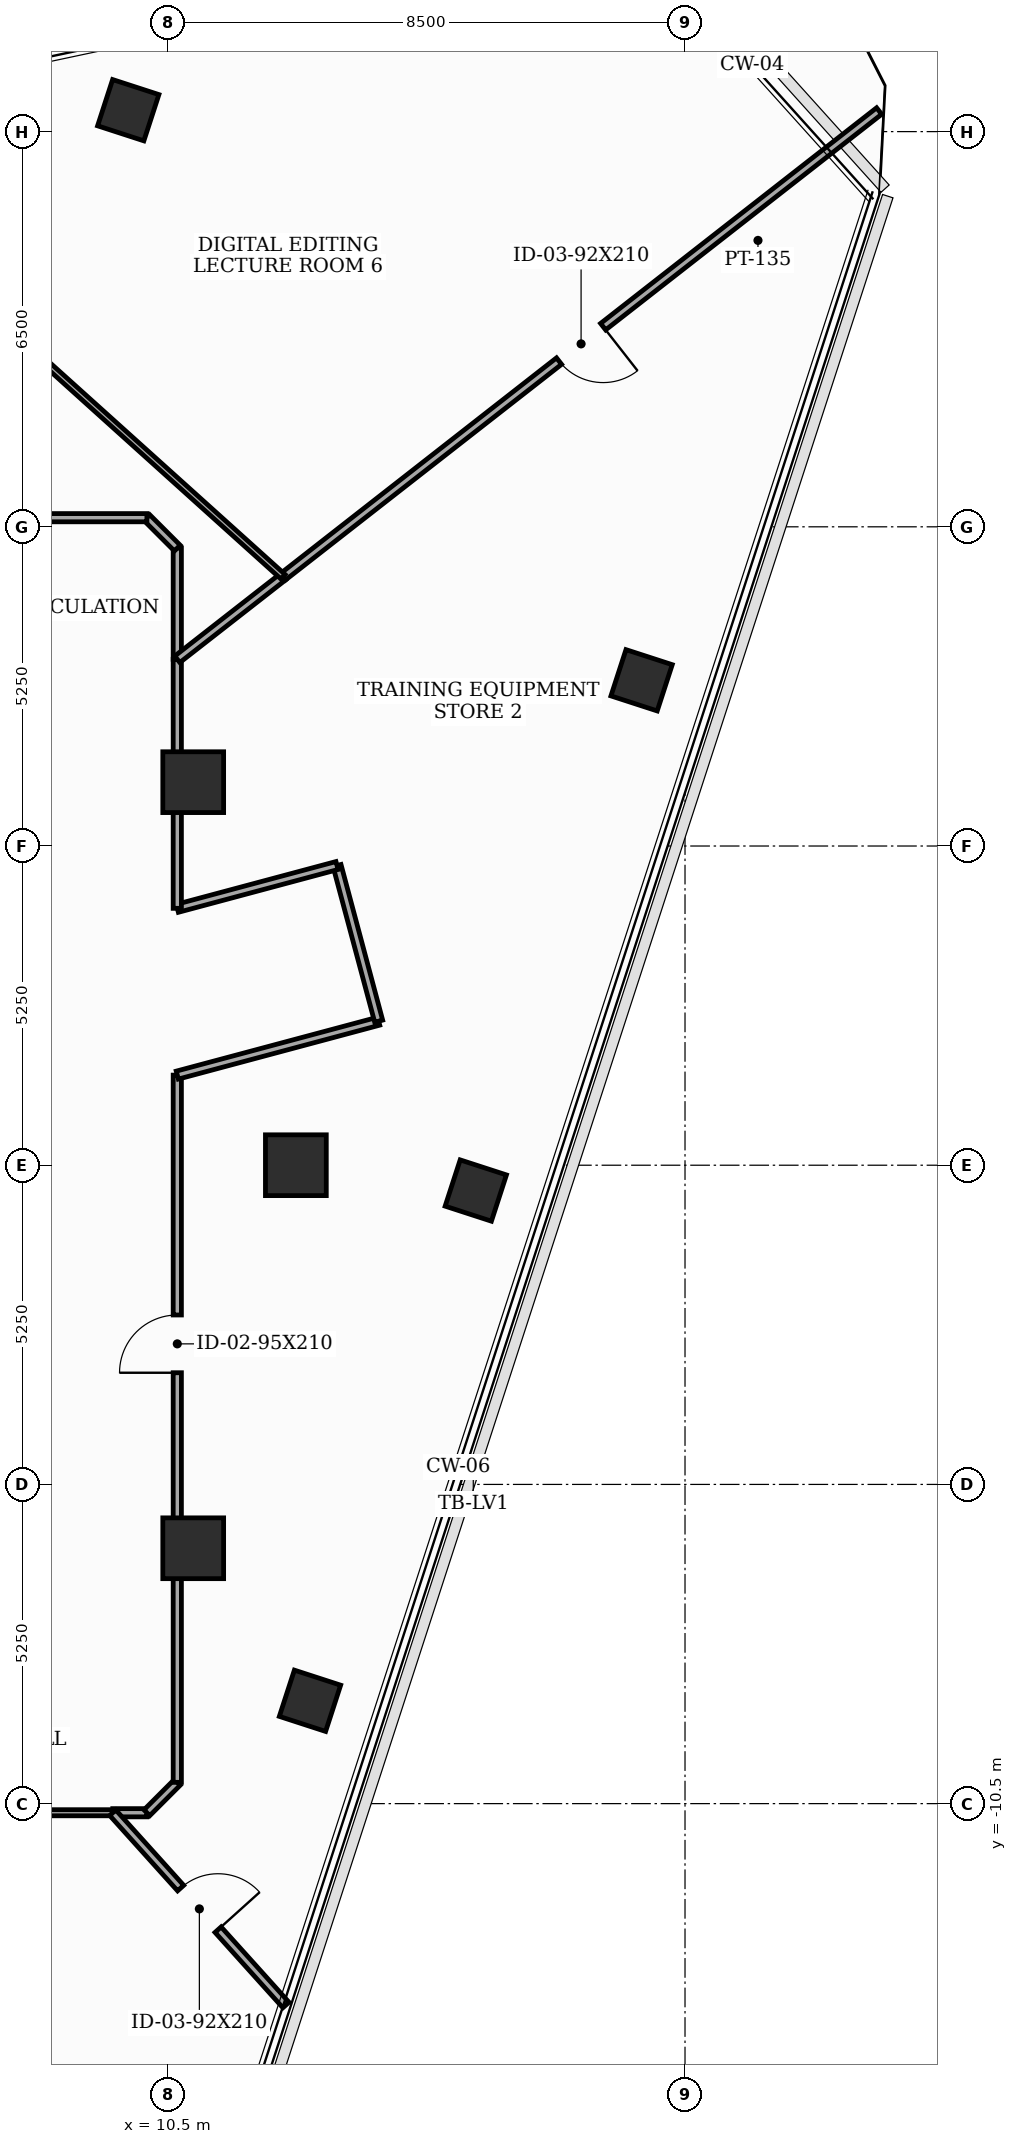
"""IFC4 building model, lengths in metres.
Left out: names, types, materials, properties, quantities, classifications, styles, units other than length and angle.
Written with IfcOpenShell. Run it as: python <this file> out.ifc"""

import sys

from ifc_helpers import new_model, si_unit, direction, frame, frame_2d, origin, origin_2d, place, context, subcontext, project, spatial, rectangle, extrude, element, fill, save


model = new_model("IFC4")
c1 = context("Model", 3, precision=1e-05, world=origin(), true_north=direction((0.0, 1.0)))
c2 = subcontext(c1, "Body", "Model", "MODEL_VIEW")
j1 = project(units=[si_unit("LENGTHUNIT", "METRE"), si_unit("PLANEANGLEUNIT", "RADIAN")], contexts=[c1])
p1 = place(None, origin())
s1 = spatial("IfcSite", under=j1, at=p1, CompositionType="ELEMENT")
p2 = place(p1, origin())
s2 = spatial("IfcBuilding", under=s1, at=p2, CompositionType="ELEMENT")
p3 = place(p2, frame((0.0, 0.0, 290.6)))
s3 = spatial("IfcBuildingStorey", under=s2, at=p3, CompositionType="ELEMENT", Elevation=290.6)
for number, where, z_axis, x_axis in (
    (1, (12.6, 0.0, 0.0), (0.0, 0.0, 1.0), (1.0, 0.0, 0.0)),
    (2, (10.912, 6.3, 0.0), (0.0, 0.0, 1.0), (1.0, 0.0, 0.0)),
    (3, (10.912, -6.3, 0.0), (0.0, 0.0, 1.0), (1.0, 0.0, 0.0)),
):
    element("IfcColumn", number, at=place(p3, frame(where, z_axis=z_axis, x_axis=x_axis)), inside=s3, PredefinedType="COLUMN", context=c2, shape_type="SweptSolid", body=[
        extrude(rectangle(XDim=1.0, YDim=1.0, at=origin_2d()), origin(), (0.0, 0.0, 1.0), 3.7),
    ])
for number, where, z_axis, x_axis in (
    (4, (12.833, -8.809, 0.0), (0.0, 0.0, 1.0), (0.309, 0.951, 0.0)),
    (5, (15.559, -0.417, 0.0), (0.0, 0.0, 1.0), (0.309, 0.951, 0.0)),
    (6, (18.286, 7.976, 0.0), (0.0, 0.0, 1.0), (0.309, 0.951, 0.0)),
    (7, (9.844, 17.352, 0.0), (0.0, 0.0, 1.0), (0.309, 0.951, 0.0)),
):
    element("IfcColumn", number, at=place(p3, frame(where, z_axis=z_axis, x_axis=x_axis)), inside=s3, PredefinedType="COLUMN", context=c2, shape_type="SweptSolid", body=[
        extrude(rectangle(XDim=0.8, YDim=0.8, at=origin_2d()), origin(), (0.0, 0.0, 1.0), 3.7),
    ])
p4 = place(p3, frame((9.589, -10.65, 0.0), z_axis=(0.0, 0.0, 1.0), x_axis=(1.0, 0.0, 0.0)))
e8 = element("IfcWall", 8, at=p4, inside=s3, PredefinedType="PARTITIONING", context=c2, shape_type="SweptSolid", body=[
    extrude(rectangle(XDim=0.561, YDim=0.135, at=frame_2d((0.28, 0.0))), origin(), (0.0, 0.0, 1.0), 3.5),
])
p5 = place(p3, frame((10.15, -10.65, 0.0), z_axis=(0.0, 0.0, 1.0), x_axis=(0.707106781187, 0.707106781187, 0.0)))
e9 = element("IfcWall", 9, at=p5, inside=s3, PredefinedType="PARTITIONING", context=c2, shape_type="SweptSolid", body=[
    extrude(rectangle(XDim=0.707, YDim=0.135, at=frame_2d((0.354, 0.0))), origin(), (0.0, 0.0, 1.0), 3.5),
])
p6 = place(p3, frame((10.65, -10.15, 0.0), z_axis=(0.0, 0.0, 1.0), x_axis=(0.0, 1.0, 0.0)))
e10 = element("IfcWall", 10, at=p6, inside=s3, PredefinedType="PARTITIONING", context=c2, shape_type="SweptSolid", body=[
    extrude(rectangle(XDim=11.632, YDim=0.135, at=frame_2d((5.816, 0.0))), origin(), (0.0, 0.0, 1.0), 2.885),
])
p7 = place(p6, frame((6.737, 0.0, 0.0)))
e11 = element("IfcOpeningElement", 11, at=p7, cuts=e10, PredefinedType="OPENING", context=c2, shape_type="SweptSolid", body=[
    extrude(rectangle(XDim=0.95, YDim=2.1, at=frame_2d((0.475, 1.05))), frame((0.0, 0.077, 0.0), z_axis=(0.0, -1.0, 0.0), x_axis=(1.0, 0.0, 0.0)), (0.0, 0.0, 1.0), 0.155),
])
p8 = place(p3, frame((10.65, 1.482, 0.0), z_axis=(0.0, 0.0, 1.0), x_axis=(0.965961397105, 0.2586862565, 0.0)))
e12 = element("IfcWall", 12, at=p8, inside=s3, PredefinedType="PARTITIONING", context=c2, shape_type="SweptSolid", body=[
    extrude(rectangle(XDim=3.429, YDim=0.135, at=frame_2d((1.714, 0.0))), origin(), (0.0, 0.0, 1.0), 2.885),
])
p9 = place(p3, frame((13.962, 2.369, 0.0), z_axis=(0.0, 0.0, 1.0), x_axis=(-0.258413725385, 0.966034340245, 0.0)))
e13 = element("IfcWall", 13, at=p9, inside=s3, PredefinedType="PARTITIONING", context=c2, shape_type="SweptSolid", body=[
    extrude(rectangle(XDim=2.65, YDim=0.135, at=frame_2d((1.325, 0.0))), origin(), (0.0, 0.0, 1.0), 3.5),
])
p10 = place(p3, frame((13.277, 4.929, 0.0), z_axis=(0.0, 0.0, 1.0), x_axis=(-0.965934830229, -0.258785439601, 0.0)))
e14 = element("IfcWall", 14, at=p10, inside=s3, PredefinedType="PARTITIONING", context=c2, shape_type="SweptSolid", body=[
    extrude(rectangle(XDim=2.72, YDim=0.135, at=frame_2d((1.36, 0.0))), origin(), (0.0, 0.0, 1.0), 2.885),
])
p11 = place(p3, frame((10.65, 4.225, 0.0), z_axis=(0.0, 0.0, 1.0), x_axis=(0.0, 1.0, 0.0)))
e15 = element("IfcWall", 15, at=p11, inside=s3, PredefinedType="PARTITIONING", context=c2, shape_type="SweptSolid", body=[
    extrude(rectangle(XDim=4.096, YDim=0.135, at=frame_2d((2.048, 0.0))), origin(), (0.0, 0.0, 1.0), 2.885),
])
p12 = place(p3, frame((2.45, -10.65, 0.0), z_axis=(0.0, 0.0, 1.0), x_axis=(1.0, 0.0, 0.0)))
e16 = element("IfcWall", 16, at=p12, inside=s3, PredefinedType="MOVABLE", context=c2, shape_type="SweptSolid", body=[
    extrude(rectangle(XDim=7.139, YDim=0.1, at=frame_2d((3.57, 0.0))), origin(), (0.0, 0.0, 1.0), 2.885),
])
p13 = place(p3, frame((10.65, 8.321, 0.0), z_axis=(0.0, 0.0, 1.0), x_axis=(0.0, 1.0, 0.0)))
e17 = element("IfcWall", 17, at=p13, inside=s3, PredefinedType="PARTITIONING", context=c2, shape_type="SweptSolid", body=[
    extrude(rectangle(XDim=1.829, YDim=0.135, at=frame_2d((0.915, 0.0))), origin(), (0.0, 0.0, 1.0), 3.5),
])
p14 = place(p3, frame((10.65, 10.15, 0.0), z_axis=(0.0, 0.0, 1.0), x_axis=(-0.707106781187, 0.707106781187, 0.0)))
e18 = element("IfcWall", 18, at=p14, inside=s3, PredefinedType="PARTITIONING", context=c2, shape_type="SweptSolid", body=[
    extrude(rectangle(XDim=0.707, YDim=0.135, at=frame_2d((0.354, 0.0))), origin(), (0.0, 0.0, 1.0), 3.5),
])
p15 = place(p3, frame((10.15, 10.65, 0.0), z_axis=(0.0, 0.0, 1.0), x_axis=(-1.0, 0.0, 0.0)))
e19 = element("IfcWall", 19, at=p15, inside=s3, PredefinedType="PARTITIONING", context=c2, shape_type="SweptSolid", body=[
    extrude(rectangle(XDim=11.3, YDim=0.135, at=frame_2d((5.65, 0.0))), origin(), (0.0, 0.0, 1.0), 2.885),
])
p16 = place(p15, frame((6.531, 0.0, 0.0)))
e20 = element("IfcOpeningElement", 20, at=p16, cuts=e19, PredefinedType="OPENING", context=c2, shape_type="SweptSolid", body=[
    extrude(rectangle(XDim=0.95, YDim=2.1, at=frame_2d((0.475, 1.05))), frame((0.0, 0.077, 0.0), z_axis=(0.0, -1.0, 0.0), x_axis=(1.0, 0.0, 0.0)), (0.0, 0.0, 1.0), 0.155),
])
p17 = place(p3, frame((9.589, -10.65, 0.0), z_axis=(0.0, 0.0, 1.0), x_axis=(0.66916439333, -0.743114402161, 0.0)))
e21 = element("IfcWall", 21, at=p17, inside=s3, PredefinedType="PARTITIONING", context=c2, shape_type="SweptSolid", body=[
    extrude(rectangle(XDim=4.256, YDim=0.135, at=frame_2d((2.128, 0.0))), origin(), (0.0, 0.0, 1.0), 3.035),
])
p18 = place(p17, frame((1.668, 0.0, 0.0)))
e22 = element("IfcOpeningElement", 22, at=p18, cuts=e21, PredefinedType="OPENING", context=c2, shape_type="SweptSolid", body=[
    extrude(rectangle(XDim=0.92, YDim=2.1, at=frame_2d((0.46, 1.05))), frame((0.0, 0.077, 0.0), z_axis=(0.0, -1.0, 0.0), x_axis=(1.0, 0.0, 0.0)), (0.0, 0.0, 1.0), 0.155),
])
p19 = place(p3, frame((22.192, 17.338, 0.0), z_axis=(0.0, 0.0, 1.0), x_axis=(-0.788006224946, -0.615667271703, 0.0)))
e23 = element("IfcWall", 23, at=p19, inside=s3, PredefinedType="PARTITIONING", context=c2, shape_type="SweptSolid", body=[
    extrude(rectangle(XDim=12.441, YDim=0.135, at=frame_2d((6.22, 0.0))), origin(), (0.0, 0.0, 1.0), 3.035),
])
p20 = place(p19, frame((5.76, 0.0, 0.0)))
e24 = element("IfcOpeningElement", 24, at=p20, cuts=e23, PredefinedType="OPENING", context=c2, shape_type="SweptSolid", body=[
    extrude(rectangle(XDim=0.92, YDim=2.1, at=frame_2d((0.46, 1.05))), frame((0.0, 0.077, 0.0), z_axis=(0.0, -1.0, 0.0), x_axis=(1.0, 0.0, 0.0)), (0.0, 0.0, 1.0), 0.155),
])
p21 = place(p3, frame((12.389, 9.679, 0.0), z_axis=(0.0, 0.0, 1.0), x_axis=(-0.788177008199, -0.615448619908, 0.0)))
e25 = element("IfcWall", 25, at=p21, inside=s3, PredefinedType="PARTITIONING", context=c2, shape_type="SweptSolid", body=[
    extrude(rectangle(XDim=2.206, YDim=0.135, at=frame_2d((1.103, 0.0))), origin(), (0.0, 0.0, 1.0), 3.5),
])
p22 = place(p3, frame((8.019, 13.614, 0.0), z_axis=(0.0, 0.0, 1.0), x_axis=(0.743110388877, -0.669168850099, 0.0)))
e26 = element("IfcWall", 26, at=p22, inside=s3, PredefinedType="MOVABLE", context=c2, shape_type="SweptSolid", body=[
    extrude(rectangle(XDim=5.881, YDim=0.1, at=frame_2d((2.94, 0.0))), origin(), (0.0, 0.0, 1.0), 3.035),
])
p23 = place(p7, origin())
e27 = element("IfcDoor", 27, at=p23, inside=s3, OperationType="SINGLE_SWING_LEFT", PredefinedType="DOOR", context=c2, shape_type="SweptSolid", body=[
    extrude(rectangle(XDim=0.95, YDim=2.1, at=frame_2d((0.475, 1.05))), frame((0.0, 0.025, 0.0), z_axis=(0.0, -1.0, 0.0), x_axis=(1.0, 0.0, 0.0)), (0.0, 0.0, 1.0), 0.05),
])
fill(e11, e27)
p24 = place(p18, origin())
e28 = element("IfcDoor", 28, at=p24, inside=s3, OperationType="SINGLE_SWING_RIGHT", PredefinedType="DOOR", context=c2, shape_type="SweptSolid", body=[
    extrude(rectangle(XDim=0.92, YDim=2.1, at=frame_2d((0.46, 1.05))), frame((0.0, 0.025, 0.0), z_axis=(0.0, -1.0, 0.0), x_axis=(1.0, 0.0, 0.0)), (0.0, 0.0, 1.0), 0.05),
])
fill(e22, e28)
p25 = place(p20, origin())
e29 = element("IfcDoor", 29, at=p25, inside=s3, OperationType="SINGLE_SWING_LEFT", PredefinedType="DOOR", context=c2, shape_type="SweptSolid", body=[
    extrude(rectangle(XDim=0.92, YDim=2.1, at=frame_2d((0.46, 1.05))), frame((0.0, 0.025, 0.0), z_axis=(0.0, -1.0, 0.0), x_axis=(1.0, 0.0, 0.0)), (0.0, 0.0, 1.0), 0.05),
])
fill(e24, e29)
save(model, sys.argv[1])
